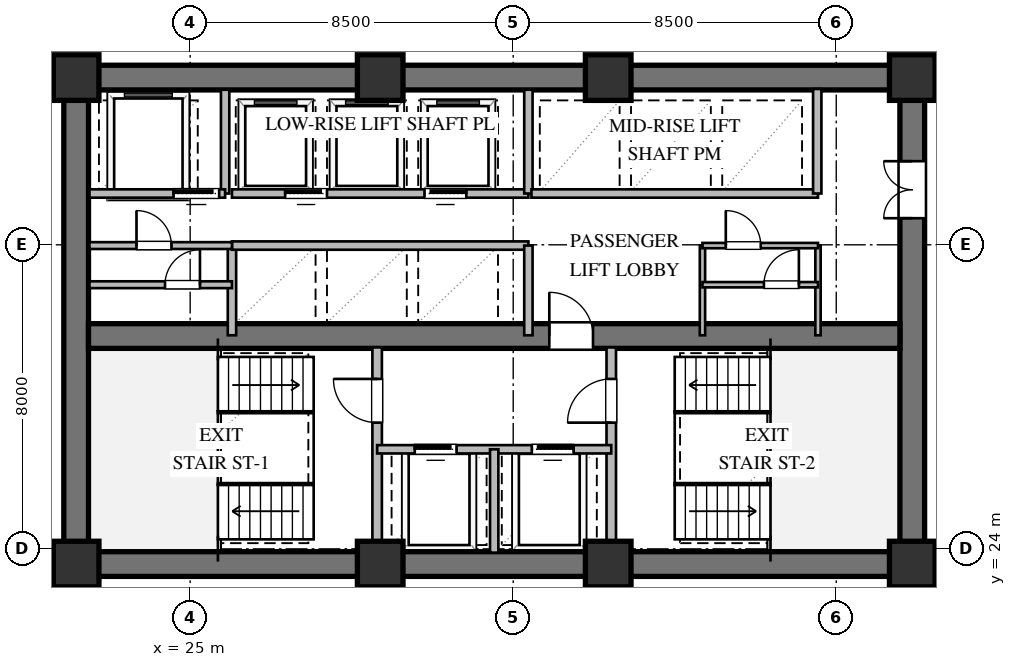
"""IFC4 building model, lengths in metres.
Left out: names, types, materials, properties, quantities, classifications, styles, units other than length and angle.
Written with IfcOpenShell. Run it as: python <this file> out.ifc"""

import sys

from ifc_helpers import new_model, si_unit, direction, frame, frame_2d, origin, origin_2d, place, context, subcontext, project, spatial, rectangle, extrude, element, fill, save


model = new_model("IFC4")
c1 = context("Model", 3, precision=1e-05, world=origin(), true_north=direction((0.0, 1.0)))
c2 = subcontext(c1, "Body", "Model", "MODEL_VIEW")
j1 = project(units=[si_unit("LENGTHUNIT", "METRE"), si_unit("PLANEANGLEUNIT", "RADIAN")], contexts=[c1])
p1 = place(None, origin())
s1 = spatial("IfcSite", under=j1, at=p1, CompositionType="ELEMENT")
p2 = place(p1, origin())
s2 = spatial("IfcBuilding", under=s1, at=p2, CompositionType="ELEMENT")
p3 = place(p2, frame((0.0, 0.0, 85.2)))
s3 = spatial("IfcBuildingStorey", under=s2, at=p3, CompositionType="ELEMENT", Elevation=85.2)
for number, where, z_axis, x_axis in (
    (1, (21.675, 23.6, 0.0), (0.0, 0.0, 1.0), (1.0, 0.0, 0.0)),
    (2, (21.675, 36.4, 0.0), (0.0, 0.0, 1.0), (1.0, 0.0, 0.0)),
):
    element("IfcWall", number, at=place(p3, frame(where, z_axis=z_axis, x_axis=x_axis)), inside=s3, PredefinedType="SHEAR", context=c2, shape_type="SweptSolid", body=[
        extrude(rectangle(XDim=22.65, YDim=0.65, at=frame_2d((11.325, 0.0))), origin(), (0.0, 0.0, 1.0), 3.36),
    ])
p4 = place(p3, frame((22.0, 23.925, 0.0), z_axis=(0.0, 0.0, 1.0), x_axis=(0.0, 1.0, 0.0)))
e3 = element("IfcWall", 3, at=p4, inside=s3, PredefinedType="SHEAR", context=c2, shape_type="SweptSolid", body=[
    extrude(rectangle(XDim=12.15, YDim=0.65, at=frame_2d((6.075, 0.0))), origin(), (0.0, 0.0, 1.0), 3.36),
])
p5 = place(p3, frame((44.0, 23.925, 0.0), z_axis=(0.0, 0.0, 1.0), x_axis=(0.0, 1.0, 0.0)))
e4 = element("IfcWall", 4, at=p5, inside=s3, PredefinedType="SHEAR", context=c2, shape_type="SweptSolid", body=[
    extrude(rectangle(XDim=12.15, YDim=0.65, at=frame_2d((6.075, 0.0))), origin(), (0.0, 0.0, 1.0), 3.36),
])
p6 = place(p5, frame((8.775, 0.0, 0.0)))
e5 = element("IfcOpeningElement", 5, at=p6, cuts=e4, PredefinedType="OPENING", context=c2, shape_type="SweptSolid", body=[
    extrude(rectangle(XDim=1.5, YDim=2.15, at=frame_2d((0.75, 1.075))), frame((0.0, 0.335, 0.0), z_axis=(0.0, -1.0, 0.0), x_axis=(1.0, 0.0, 0.0)), (0.0, 0.0, 1.0), 0.67),
])
p7 = place(p3, frame((22.325, 29.6, 0.0), z_axis=(0.0, 0.0, 1.0), x_axis=(1.0, 0.0, 0.0)))
e6 = element("IfcWall", 6, at=p7, inside=s3, PredefinedType="SHEAR", context=c2, shape_type="SweptSolid", body=[
    extrude(rectangle(XDim=21.35, YDim=0.65, at=frame_2d((10.675, 0.0))), origin(), (0.0, 0.0, 1.0), 3.36),
])
p8 = place(p7, frame((12.125, 0.0, 0.0)))
e7 = element("IfcOpeningElement", 7, at=p8, cuts=e6, PredefinedType="OPENING", context=c2, shape_type="SweptSolid", body=[
    extrude(rectangle(XDim=1.15, YDim=2.1, at=frame_2d((0.575, 1.05))), frame((0.0, 0.335, 0.0), z_axis=(0.0, -1.0, 0.0), x_axis=(1.0, 0.0, 0.0)), (0.0, 0.0, 1.0), 0.67),
])
for number, where, z_axis, x_axis in (
    (8, (22.0, 23.6, 0.0), (0.0, 0.0, 1.0), (1.0, 0.0, 0.0)),
    (9, (30.0, 23.6, 0.0), (0.0, 0.0, 1.0), (1.0, 0.0, 0.0)),
    (10, (36.0, 23.6, 0.0), (0.0, 0.0, 1.0), (1.0, 0.0, 0.0)),
    (11, (44.0, 23.6, 0.0), (0.0, 0.0, 1.0), (1.0, 0.0, 0.0)),
    (12, (44.0, 36.4, 0.0), (0.0, 0.0, 1.0), (1.0, 0.0, 0.0)),
    (13, (36.0, 36.4, 0.0), (0.0, 0.0, 1.0), (1.0, 0.0, 0.0)),
    (14, (30.0, 36.4, 0.0), (0.0, 0.0, 1.0), (1.0, 0.0, 0.0)),
    (15, (22.0, 36.4, 0.0), (0.0, 0.0, 1.0), (1.0, 0.0, 0.0)),
):
    element("IfcColumn", number, at=place(p3, frame(where, z_axis=z_axis, x_axis=x_axis)), inside=s3, PredefinedType="COLUMN", context=c2, shape_type="SweptSolid", body=[
        extrude(rectangle(XDim=1.2, YDim=1.2, at=origin_2d()), origin(), (0.0, 0.0, 1.0), 3.6),
    ])
p9 = place(p3, frame((29.92, 23.9, 0.0), z_axis=(0.0, 0.0, 1.0), x_axis=(0.0, 1.0, 0.0)))
e16 = element("IfcWall", 16, at=p9, inside=s3, PredefinedType="SOLIDWALL", context=c2, shape_type="SweptSolid", body=[
    extrude(rectangle(XDim=5.4, YDim=0.25, at=frame_2d((2.7, 0.0))), origin(), (0.0, 0.0, 1.0), 3.36),
])
p10 = place(p9, frame((3.421, 0.0, 0.0)))
e17 = element("IfcOpeningElement", 17, at=p10, cuts=e16, PredefinedType="OPENING", context=c2, shape_type="SweptSolid", body=[
    extrude(rectangle(XDim=1.15, YDim=2.1, at=frame_2d((0.575, 1.05))), frame((0.0, 0.135, 0.0), z_axis=(0.0, -1.0, 0.0), x_axis=(1.0, 0.0, 0.0)), (0.0, 0.0, 1.0), 0.27),
])
p11 = place(p3, frame((36.08, 23.9, 0.0), z_axis=(0.0, 0.0, 1.0), x_axis=(0.0, 1.0, 0.0)))
e18 = element("IfcWall", 18, at=p11, inside=s3, PredefinedType="SOLIDWALL", context=c2, shape_type="SweptSolid", body=[
    extrude(rectangle(XDim=5.4, YDim=0.25, at=frame_2d((2.7, 0.0))), origin(), (0.0, 0.0, 1.0), 3.36),
])
p12 = place(p11, frame((3.421, 0.0, 0.0)))
e19 = element("IfcOpeningElement", 19, at=p12, cuts=e18, PredefinedType="OPENING", context=c2, shape_type="SweptSolid", body=[
    extrude(rectangle(XDim=1.15, YDim=2.1, at=frame_2d((0.575, 1.05))), frame((0.0, 0.135, 0.0), z_axis=(0.0, -1.0, 0.0), x_axis=(1.0, 0.0, 0.0)), (0.0, 0.0, 1.0), 0.27),
])
p13 = place(p3, frame((29.92, 26.62, 0.0), z_axis=(0.0, 0.0, 1.0), x_axis=(1.0, 0.0, 0.0)))
e20 = element("IfcWall", 20, at=p13, inside=s3, PredefinedType="SOLIDWALL", context=c2, shape_type="SweptSolid", body=[
    extrude(rectangle(XDim=6.16, YDim=0.22, at=frame_2d((3.08, 0.0))), origin(), (0.0, 0.0, 1.0), 3.36),
])
p14 = place(p13, frame((0.99, 0.0, 0.0)))
e21 = element("IfcOpeningElement", 21, at=p14, cuts=e20, PredefinedType="OPENING", context=c2, shape_type="SweptSolid", body=[
    extrude(rectangle(XDim=1.1, YDim=2.1, at=frame_2d((0.55, 1.05))), frame((0.0, 0.12, 0.0), z_axis=(0.0, -1.0, 0.0), x_axis=(1.0, 0.0, 0.0)), (0.0, 0.0, 1.0), 0.24),
])
p15 = place(p13, frame((4.07, 0.0, 0.0)))
e22 = element("IfcOpeningElement", 22, at=p15, cuts=e20, PredefinedType="OPENING", context=c2, shape_type="SweptSolid", body=[
    extrude(rectangle(XDim=1.1, YDim=2.1, at=frame_2d((0.55, 1.05))), frame((0.0, 0.12, 0.0), z_axis=(0.0, -1.0, 0.0), x_axis=(1.0, 0.0, 0.0)), (0.0, 0.0, 1.0), 0.24),
])
p16 = place(p3, frame((33.0, 23.9, 0.0), z_axis=(0.0, 0.0, 1.0), x_axis=(0.0, 1.0, 0.0)))
e23 = element("IfcWall", 23, at=p16, inside=s3, PredefinedType="SOLIDWALL", context=c2, shape_type="SweptSolid", body=[
    extrude(rectangle(XDim=2.72, YDim=0.22, at=frame_2d((1.36, 0.0))), origin(), (0.0, 0.0, 1.0), 3.36),
])
p17 = place(p3, frame((25.92, 33.35, 0.0), z_axis=(0.0, 0.0, 1.0), x_axis=(0.0, 1.0, 0.0)))
e24 = element("IfcWall", 24, at=p17, inside=s3, PredefinedType="SOLIDWALL", context=c2, shape_type="SweptSolid", body=[
    extrude(rectangle(XDim=2.73, YDim=0.22, at=frame_2d((1.365, 0.0))), origin(), (0.0, 0.0, 1.0), 3.36),
])
p18 = place(p3, frame((22.35, 33.35, 0.0), z_axis=(0.0, 0.0, 1.0), x_axis=(1.0, 0.0, 0.0)))
e25 = element("IfcWall", 25, at=p18, inside=s3, PredefinedType="SOLIDWALL", context=c2, shape_type="SweptSolid", body=[
    extrude(rectangle(XDim=3.57, YDim=0.22, at=frame_2d((1.785, 0.0))), origin(), (0.0, 0.0, 1.0), 3.36),
])
p19 = place(p18, frame((2.213, 0.0, 0.0)))
e26 = element("IfcOpeningElement", 26, at=p19, cuts=e25, PredefinedType="OPENING", context=c2, shape_type="SweptSolid", body=[
    extrude(rectangle(XDim=1.2, YDim=2.1, at=frame_2d((0.6, 1.05))), frame((0.0, 0.12, 0.0), z_axis=(0.0, -1.0, 0.0), x_axis=(1.0, 0.0, 0.0)), (0.0, 0.0, 1.0), 0.24),
])
p20 = place(p3, frame((26.1, 29.62, 0.0), z_axis=(0.0, 0.0, 1.0), x_axis=(0.0, 1.0, 0.0)))
e27 = element("IfcWall", 27, at=p20, inside=s3, PredefinedType="SOLIDWALL", context=c2, shape_type="SweptSolid", body=[
    extrude(rectangle(XDim=2.36, YDim=0.22, at=frame_2d((1.18, 0.0))), origin(), (0.0, 0.0, 1.0), 3.36),
])
p21 = place(p3, frame((26.1, 31.98, 0.0), z_axis=(0.0, 0.0, 1.0), x_axis=(1.0, 0.0, 0.0)))
e28 = element("IfcWall", 28, at=p21, inside=s3, PredefinedType="SOLIDWALL", context=c2, shape_type="SweptSolid", body=[
    extrude(rectangle(XDim=7.8, YDim=0.22, at=frame_2d((3.9, 0.0))), origin(), (0.0, 0.0, 1.0), 3.36),
])
p22 = place(p3, frame((33.9, 29.62, 0.0), z_axis=(0.0, 0.0, 1.0), x_axis=(0.0, 1.0, 0.0)))
e29 = element("IfcWall", 29, at=p22, inside=s3, PredefinedType="SOLIDWALL", context=c2, shape_type="SweptSolid", body=[
    extrude(rectangle(XDim=2.36, YDim=0.22, at=frame_2d((1.18, 0.0))), origin(), (0.0, 0.0, 1.0), 3.36),
])
p23 = place(p3, frame((26.1, 33.35, 0.0), z_axis=(0.0, 0.0, 1.0), x_axis=(1.0, 0.0, 0.0)))
e30 = element("IfcWall", 30, at=p23, inside=s3, PredefinedType="SOLIDWALL", context=c2, shape_type="SweptSolid", body=[
    extrude(rectangle(XDim=7.8, YDim=0.22, at=frame_2d((3.9, 0.0))), origin(), (0.0, 0.0, 1.0), 3.36),
])
p24 = place(p23, frame((1.4, 0.0, 0.0)))
e31 = element("IfcOpeningElement", 31, at=p24, cuts=e30, PredefinedType="OPENING", context=c2, shape_type="SweptSolid", body=[
    extrude(rectangle(XDim=1.1, YDim=2.1, at=frame_2d((0.55, 1.05))), frame((0.0, 0.12, 0.0), z_axis=(0.0, -1.0, 0.0), x_axis=(1.0, 0.0, 0.0)), (0.0, 0.0, 1.0), 0.24),
])
p25 = place(p23, frame((5.066, 0.0, 0.0)))
e32 = element("IfcOpeningElement", 32, at=p25, cuts=e30, PredefinedType="OPENING", context=c2, shape_type="SweptSolid", body=[
    extrude(rectangle(XDim=1.1, YDim=2.1, at=frame_2d((0.55, 1.05))), frame((0.0, 0.12, 0.0), z_axis=(0.0, -1.0, 0.0), x_axis=(1.0, 0.0, 0.0)), (0.0, 0.0, 1.0), 0.24),
])
p26 = place(p3, frame((33.9, 33.35, 0.0), z_axis=(0.0, 0.0, 1.0), x_axis=(0.0, 1.0, 0.0)))
e33 = element("IfcWall", 33, at=p26, inside=s3, PredefinedType="SOLIDWALL", context=c2, shape_type="SweptSolid", body=[
    extrude(rectangle(XDim=2.73, YDim=0.22, at=frame_2d((1.365, 0.0))), origin(), (0.0, 0.0, 1.0), 3.36),
])
p27 = place(p3, frame((33.98, 33.35, 0.0), z_axis=(0.0, 0.0, 1.0), x_axis=(1.0, 0.0, 0.0)))
e34 = element("IfcWall", 34, at=p27, inside=s3, PredefinedType="SOLIDWALL", context=c2, shape_type="SweptSolid", body=[
    extrude(rectangle(XDim=7.54, YDim=0.22, at=frame_2d((3.77, 0.0))), origin(), (0.0, 0.0, 1.0), 3.36),
])
p28 = place(p3, frame((41.5, 33.35, 0.0), z_axis=(0.0, 0.0, 1.0), x_axis=(0.0, 1.0, 0.0)))
e35 = element("IfcWall", 35, at=p28, inside=s3, PredefinedType="SOLIDWALL", context=c2, shape_type="SweptSolid", body=[
    extrude(rectangle(XDim=2.75, YDim=0.22, at=frame_2d((1.375, 0.0))), origin(), (0.0, 0.0, 1.0), 3.36),
])
p29 = place(p3, frame((22.35, 30.95, 0.0), z_axis=(0.0, 0.0, 1.0), x_axis=(1.0, 0.0, 0.0)))
e36 = element("IfcWall", 36, at=p29, inside=s3, PredefinedType="PARTITIONING", context=c2, shape_type="SweptSolid", body=[
    extrude(rectangle(XDim=3.75, YDim=0.18, at=frame_2d((1.875, 0.0))), origin(), (0.0, 0.0, 1.0), 3.36),
])
p30 = place(p29, frame((1.988, 0.0, 0.0)))
e37 = element("IfcOpeningElement", 37, at=p30, cuts=e36, PredefinedType="OPENING", context=c2, shape_type="SweptSolid", body=[
    extrude(rectangle(XDim=0.92, YDim=2.1, at=frame_2d((0.46, 1.05))), frame((0.0, 0.1, 0.0), z_axis=(0.0, -1.0, 0.0), x_axis=(1.0, 0.0, 0.0)), (0.0, 0.0, 1.0), 0.2),
])
p31 = place(p3, frame((22.35, 31.98, 0.0), z_axis=(0.0, 0.0, 1.0), x_axis=(1.0, 0.0, 0.0)))
e38 = element("IfcWall", 38, at=p31, inside=s3, PredefinedType="PARTITIONING", context=c2, shape_type="SweptSolid", body=[
    extrude(rectangle(XDim=3.75, YDim=0.18, at=frame_2d((1.875, 0.0))), origin(), (0.0, 0.0, 1.0), 3.36),
])
p32 = place(p31, frame((1.238, 0.0, 0.0)))
e39 = element("IfcOpeningElement", 39, at=p32, cuts=e38, PredefinedType="OPENING", context=c2, shape_type="SweptSolid", body=[
    extrude(rectangle(XDim=0.92, YDim=2.1, at=frame_2d((0.46, 1.05))), frame((0.0, 0.1, 0.0), z_axis=(0.0, -1.0, 0.0), x_axis=(1.0, 0.0, 0.0)), (0.0, 0.0, 1.0), 0.2),
])
for number, where, z_axis, x_axis in (
    (40, (38.48, 29.62, 0.0), (0.0, 0.0, 1.0), (0.0, 1.0, 0.0)),
    (41, (41.52, 29.62, 0.0), (0.0, 0.0, 1.0), (0.0, 1.0, 0.0)),
):
    element("IfcWall", number, at=place(p3, frame(where, z_axis=z_axis, x_axis=x_axis)), inside=s3, PredefinedType="PARTITIONING", context=c2, shape_type="SweptSolid", body=[
        extrude(rectangle(XDim=2.36, YDim=0.14, at=frame_2d((1.18, 0.0))), origin(), (0.0, 0.0, 1.0), 3.36),
    ])
p33 = place(p3, frame((38.48, 30.95, 0.0), z_axis=(0.0, 0.0, 1.0), x_axis=(1.0, 0.0, 0.0)))
e42 = element("IfcWall", 42, at=p33, inside=s3, PredefinedType="PARTITIONING", context=c2, shape_type="SweptSolid", body=[
    extrude(rectangle(XDim=3.04, YDim=0.14, at=frame_2d((1.52, 0.0))), origin(), (0.0, 0.0, 1.0), 3.36),
])
p34 = place(p33, frame((1.617, 0.0, 0.0)))
e43 = element("IfcOpeningElement", 43, at=p34, cuts=e42, PredefinedType="OPENING", context=c2, shape_type="SweptSolid", body=[
    extrude(rectangle(XDim=0.92, YDim=2.1, at=frame_2d((0.46, 1.05))), frame((0.0, 0.08, 0.0), z_axis=(0.0, -1.0, 0.0), x_axis=(1.0, 0.0, 0.0)), (0.0, 0.0, 1.0), 0.16),
])
p35 = place(p3, frame((38.48, 31.98, 0.0), z_axis=(0.0, 0.0, 1.0), x_axis=(1.0, 0.0, 0.0)))
e44 = element("IfcWall", 44, at=p35, inside=s3, PredefinedType="PARTITIONING", context=c2, shape_type="SweptSolid", body=[
    extrude(rectangle(XDim=3.04, YDim=0.14, at=frame_2d((1.52, 0.0))), origin(), (0.0, 0.0, 1.0), 3.36),
])
p36 = place(p35, frame((0.614, 0.0, 0.0)))
e45 = element("IfcOpeningElement", 45, at=p36, cuts=e44, PredefinedType="OPENING", context=c2, shape_type="SweptSolid", body=[
    extrude(rectangle(XDim=0.92, YDim=2.1, at=frame_2d((0.46, 1.05))), frame((0.0, 0.08, 0.0), z_axis=(0.0, -1.0, 0.0), x_axis=(1.0, 0.0, 0.0)), (0.0, 0.0, 1.0), 0.16),
])
p37 = place(p10, origin())
e46 = element("IfcDoor", 46, at=p37, inside=s3, OperationType="SINGLE_SWING_RIGHT", PredefinedType="DOOR", context=c2, shape_type="SweptSolid", body=[
    extrude(rectangle(XDim=1.15, YDim=2.1, at=frame_2d((0.575, 1.05))), frame((0.0, 0.025, 0.0), z_axis=(0.0, -1.0, 0.0), x_axis=(1.0, 0.0, 0.0)), (0.0, 0.0, 1.0), 0.05),
])
fill(e17, e46)
p38 = place(p12, origin())
e47 = element("IfcDoor", 47, at=p38, inside=s3, OperationType="SINGLE_SWING_LEFT", PredefinedType="DOOR", context=c2, shape_type="SweptSolid", body=[
    extrude(rectangle(XDim=1.15, YDim=2.1, at=frame_2d((0.575, 1.05))), frame((0.0, 0.025, 0.0), z_axis=(0.0, -1.0, 0.0), x_axis=(1.0, 0.0, 0.0)), (0.0, 0.0, 1.0), 0.05),
])
fill(e19, e47)
p39 = place(p14, origin())
e48 = element("IfcDoor", 48, at=p39, inside=s3, OperationType="SLIDING_TO_LEFT", PredefinedType="DOOR", context=c2, shape_type="SweptSolid", body=[
    extrude(rectangle(XDim=1.1, YDim=2.1, at=frame_2d((0.55, 1.05))), frame((0.0, 0.025, 0.0), z_axis=(0.0, -1.0, 0.0), x_axis=(1.0, 0.0, 0.0)), (0.0, 0.0, 1.0), 0.05),
])
fill(e21, e48)
p40 = place(p15, origin())
e49 = element("IfcDoor", 49, at=p40, inside=s3, OperationType="SLIDING_TO_RIGHT", PredefinedType="DOOR", context=c2, shape_type="SweptSolid", body=[
    extrude(rectangle(XDim=1.1, YDim=2.1, at=frame_2d((0.55, 1.05))), frame((0.0, 0.025, 0.0), z_axis=(0.0, -1.0, 0.0), x_axis=(1.0, 0.0, 0.0)), (0.0, 0.0, 1.0), 0.05),
])
fill(e22, e49)
p41 = place(p8, origin())
e50 = element("IfcDoor", 50, at=p41, inside=s3, OperationType="SINGLE_SWING_LEFT", PredefinedType="DOOR", context=c2, shape_type="SweptSolid", body=[
    extrude(rectangle(XDim=1.15, YDim=2.1, at=frame_2d((0.575, 1.05))), frame((0.0, 0.025, 0.0), z_axis=(0.0, -1.0, 0.0), x_axis=(1.0, 0.0, 0.0)), (0.0, 0.0, 1.0), 0.05),
])
fill(e7, e50)
p42 = place(p6, origin())
e51 = element("IfcDoor", 51, at=p42, inside=s3, OperationType="DOUBLE_DOOR_SINGLE_SWING", PredefinedType="DOOR", context=c2, shape_type="SweptSolid", body=[
    extrude(rectangle(XDim=1.5, YDim=2.15, at=frame_2d((0.75, 1.075))), frame((0.0, 0.025, 0.0), z_axis=(0.0, -1.0, 0.0), x_axis=(1.0, 0.0, 0.0)), (0.0, 0.0, 1.0), 0.05),
])
fill(e5, e51)
p43 = place(p19, origin())
e52 = element("IfcDoor", 52, at=p43, inside=s3, OperationType="SLIDING_TO_LEFT", PredefinedType="DOOR", context=c2, shape_type="SweptSolid", body=[
    extrude(rectangle(XDim=1.2, YDim=2.1, at=frame_2d((0.6, 1.05))), frame((0.0, 0.025, 0.0), z_axis=(0.0, -1.0, 0.0), x_axis=(1.0, 0.0, 0.0)), (0.0, 0.0, 1.0), 0.05),
])
fill(e26, e52)
p44 = place(p24, origin())
e53 = element("IfcDoor", 53, at=p44, inside=s3, OperationType="SLIDING_TO_LEFT", PredefinedType="DOOR", context=c2, shape_type="SweptSolid", body=[
    extrude(rectangle(XDim=1.1, YDim=2.1, at=frame_2d((0.55, 1.05))), frame((0.0, 0.025, 0.0), z_axis=(0.0, -1.0, 0.0), x_axis=(1.0, 0.0, 0.0)), (0.0, 0.0, 1.0), 0.05),
])
fill(e31, e53)
p45 = place(p25, origin())
e54 = element("IfcDoor", 54, at=p45, inside=s3, OperationType="SLIDING_TO_RIGHT", PredefinedType="DOOR", context=c2, shape_type="SweptSolid", body=[
    extrude(rectangle(XDim=1.1, YDim=2.1, at=frame_2d((0.55, 1.05))), frame((0.0, 0.025, 0.0), z_axis=(0.0, -1.0, 0.0), x_axis=(1.0, 0.0, 0.0)), (0.0, 0.0, 1.0), 0.05),
])
fill(e32, e54)
p46 = place(p32, origin())
e55 = element("IfcDoor", 55, at=p46, inside=s3, OperationType="SINGLE_SWING_LEFT", PredefinedType="DOOR", context=c2, shape_type="SweptSolid", body=[
    extrude(rectangle(XDim=0.92, YDim=2.1, at=frame_2d((0.46, 1.05))), frame((0.0, 0.025, 0.0), z_axis=(0.0, -1.0, 0.0), x_axis=(1.0, 0.0, 0.0)), (0.0, 0.0, 1.0), 0.05),
])
fill(e39, e55)
p47 = place(p30, origin())
e56 = element("IfcDoor", 56, at=p47, inside=s3, OperationType="SINGLE_SWING_RIGHT", PredefinedType="DOOR", context=c2, shape_type="SweptSolid", body=[
    extrude(rectangle(XDim=0.92, YDim=2.1, at=frame_2d((0.46, 1.05))), frame((0.0, 0.025, 0.0), z_axis=(0.0, -1.0, 0.0), x_axis=(1.0, 0.0, 0.0)), (0.0, 0.0, 1.0), 0.05),
])
fill(e37, e56)
p48 = place(p36, origin())
e57 = element("IfcDoor", 57, at=p48, inside=s3, OperationType="SINGLE_SWING_LEFT", PredefinedType="DOOR", context=c2, shape_type="SweptSolid", body=[
    extrude(rectangle(XDim=0.92, YDim=2.1, at=frame_2d((0.46, 1.05))), frame((0.0, 0.025, 0.0), z_axis=(0.0, -1.0, 0.0), x_axis=(1.0, 0.0, 0.0)), (0.0, 0.0, 1.0), 0.05),
])
fill(e45, e57)
p49 = place(p34, origin())
e58 = element("IfcDoor", 58, at=p49, inside=s3, OperationType="SINGLE_SWING_RIGHT", PredefinedType="DOOR", context=c2, shape_type="SweptSolid", body=[
    extrude(rectangle(XDim=0.92, YDim=2.1, at=frame_2d((0.46, 1.05))), frame((0.0, 0.025, 0.0), z_axis=(0.0, -1.0, 0.0), x_axis=(1.0, 0.0, 0.0)), (0.0, 0.0, 1.0), 0.05),
])
fill(e43, e58)
save(model, sys.argv[1])
